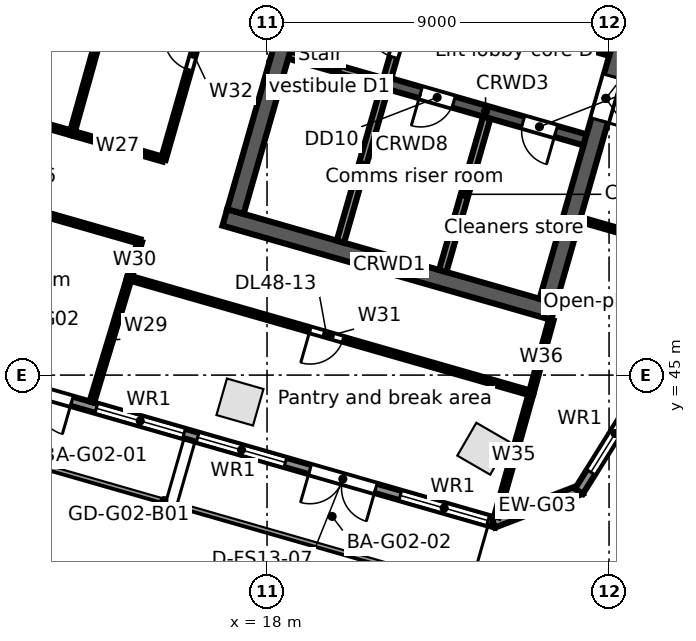
"""IFC4 building model, lengths in metres.
Left out: names, types, materials, properties, quantities, classifications, styles, units other than length and angle.
Written with IfcOpenShell. Run it as: python <this file> out.ifc"""

import sys

from ifc_helpers import new_model, si_unit, direction, frame, frame_2d, origin, origin_2d, place, context, subcontext, project, spatial, rectangle, extrude, element, fill, save


model = new_model("IFC4")
c1 = context("Model", 3, precision=1e-05, world=origin(), true_north=direction((0.0, 1.0)))
c2 = subcontext(c1, "Body", "Model", "MODEL_VIEW")
j1 = project(units=[si_unit("LENGTHUNIT", "METRE"), si_unit("PLANEANGLEUNIT", "RADIAN")], contexts=[c1])
p1 = place(None, origin())
s1 = spatial("IfcSite", under=j1, at=p1, CompositionType="ELEMENT")
p2 = place(p1, origin())
s2 = spatial("IfcBuilding", under=s1, at=p2, CompositionType="ELEMENT")
p3 = place(p2, frame((0.0, 0.0, 227.0)))
s3 = spatial("IfcBuildingStorey", under=s2, at=p3, CompositionType="ELEMENT", Elevation=227.0)
for number, where, z_axis, x_axis in (
    (1, (17.288, 44.291, 0.0), (0.0, 0.0, 1.0), (0.961, -0.276, 0.0)),
    (2, (23.69, 43.063, 0.0), (0.0, 0.0, 1.0), (-0.865, 0.501, 0.0)),
):
    element("IfcColumn", number, at=place(p3, frame(where, z_axis=z_axis, x_axis=x_axis)), inside=s3, PredefinedType="COLUMN", context=c2, shape_type="SweptSolid", body=[
        extrude(rectangle(XDim=1.0, YDim=1.0, at=origin_2d()), origin(), (0.0, 0.0, 1.0), 3.9),
    ])
p4 = place(p3, frame((24.034, 41.108, 0.0), z_axis=(0.0, 0.0, 1.0), x_axis=(-0.96126060691, 0.275641153683, 0.0)))
e3 = element("IfcWall", 3, at=p4, inside=s3, PredefinedType="STANDARD", context=c2, shape_type="SweptSolid", body=[
    extrude(rectangle(XDim=24.951, YDim=0.25, at=frame_2d((12.475, 0.0))), origin(), (0.0, 0.0, 1.0), 3.55),
])
p5 = place(p4, frame((22.416, 0.0, 0.8)))
e4 = element("IfcOpeningElement", 4, at=p5, cuts=e3, PredefinedType="OPENING", context=c2, shape_type="SweptSolid", body=[
    extrude(rectangle(XDim=2.4, YDim=2.2, at=frame_2d((1.2, 1.1))), frame((0.0, 0.135, 0.0), z_axis=(0.0, -1.0, 0.0), x_axis=(1.0, 0.0, 0.0)), (0.0, 0.0, 1.0), 0.27),
])
p6 = place(p4, frame((19.643, 0.0, 0.8)))
e5 = element("IfcOpeningElement", 5, at=p6, cuts=e3, PredefinedType="OPENING", context=c2, shape_type="SweptSolid", body=[
    extrude(rectangle(XDim=2.4, YDim=2.2, at=frame_2d((1.2, 1.1))), frame((0.0, 0.135, 0.0), z_axis=(0.0, -1.0, 0.0), x_axis=(1.0, 0.0, 0.0)), (0.0, 0.0, 1.0), 0.27),
])
p7 = place(p4, frame((16.869, 0.0, 0.8)))
e6 = element("IfcOpeningElement", 6, at=p7, cuts=e3, PredefinedType="OPENING", context=c2, shape_type="SweptSolid", body=[
    extrude(rectangle(XDim=2.4, YDim=2.2, at=frame_2d((1.2, 1.1))), frame((0.0, 0.135, 0.0), z_axis=(0.0, -1.0, 0.0), x_axis=(1.0, 0.0, 0.0)), (0.0, 0.0, 1.0), 0.27),
])
p8 = place(p4, frame((14.096, 0.0, 0.8)))
e7 = element("IfcOpeningElement", 7, at=p8, cuts=e3, PredefinedType="OPENING", context=c2, shape_type="SweptSolid", body=[
    extrude(rectangle(XDim=2.4, YDim=2.2, at=frame_2d((1.2, 1.1))), frame((0.0, 0.135, 0.0), z_axis=(0.0, -1.0, 0.0), x_axis=(1.0, 0.0, 0.0)), (0.0, 0.0, 1.0), 0.27),
])
p9 = place(p4, frame((11.622, 0.0, 0.0)))
e8 = element("IfcOpeningElement", 8, at=p9, cuts=e3, PredefinedType="OPENING", context=c2, shape_type="SweptSolid", body=[
    extrude(rectangle(XDim=1.8, YDim=2.4, at=frame_2d((0.9, 1.2))), frame((0.0, 0.135, 0.0), z_axis=(0.0, -1.0, 0.0), x_axis=(1.0, 0.0, 0.0)), (0.0, 0.0, 1.0), 0.27),
])
p10 = place(p4, frame((8.549, 0.0, 0.8)))
e9 = element("IfcOpeningElement", 9, at=p10, cuts=e3, PredefinedType="OPENING", context=c2, shape_type="SweptSolid", body=[
    extrude(rectangle(XDim=2.4, YDim=2.2, at=frame_2d((1.2, 1.1))), frame((0.0, 0.135, 0.0), z_axis=(0.0, -1.0, 0.0), x_axis=(1.0, 0.0, 0.0)), (0.0, 0.0, 1.0), 0.27),
])
p11 = place(p4, frame((5.775, 0.0, 0.8)))
e10 = element("IfcOpeningElement", 10, at=p11, cuts=e3, PredefinedType="OPENING", context=c2, shape_type="SweptSolid", body=[
    extrude(rectangle(XDim=2.4, YDim=2.2, at=frame_2d((1.2, 1.1))), frame((0.0, 0.135, 0.0), z_axis=(0.0, -1.0, 0.0), x_axis=(1.0, 0.0, 0.0)), (0.0, 0.0, 1.0), 0.27),
])
p12 = place(p4, frame((3.302, 0.0, 0.0)))
e11 = element("IfcOpeningElement", 11, at=p12, cuts=e3, PredefinedType="OPENING", context=c2, shape_type="SweptSolid", body=[
    extrude(rectangle(XDim=1.8, YDim=2.4, at=frame_2d((0.9, 1.2))), frame((0.0, 0.135, 0.0), z_axis=(0.0, -1.0, 0.0), x_axis=(1.0, 0.0, 0.0)), (0.0, 0.0, 1.0), 0.27),
])
p13 = place(p4, frame((0.229, 0.0, 0.8)))
e12 = element("IfcOpeningElement", 12, at=p13, cuts=e3, PredefinedType="OPENING", context=c2, shape_type="SweptSolid", body=[
    extrude(rectangle(XDim=2.4, YDim=2.2, at=frame_2d((1.2, 1.1))), frame((0.0, 0.135, 0.0), z_axis=(0.0, -1.0, 0.0), x_axis=(1.0, 0.0, 0.0)), (0.0, 0.0, 1.0), 0.27),
])
p14 = place(p3, frame((26.27, 41.993, 0.0), z_axis=(0.0, 0.0, 1.0), x_axis=(-0.933573798066, -0.358385216722, 0.0)))
e13 = element("IfcWall", 13, at=p14, inside=s3, PredefinedType="STANDARD", context=c2, shape_type="SweptSolid", body=[
    extrude(rectangle(XDim=2.48, YDim=0.25, at=frame_2d((1.24, 0.0))), origin(), (0.0, 0.0, 1.0), 3.55),
])
p15 = place(p3, frame((37.392, 59.84, 0.0), z_axis=(0.0, 0.0, 1.0), x_axis=(-0.529919909431, -0.848047692992, 0.0)))
e14 = element("IfcWall", 14, at=p15, inside=s3, PredefinedType="STANDARD", context=c2, shape_type="SweptSolid", body=[
    extrude(rectangle(XDim=21.104, YDim=0.25, at=frame_2d((10.552, 0.0))), origin(), (0.0, 0.0, 1.0), 3.55),
])
p16 = place(p15, frame((18.112, 0.0, 0.8)))
e15 = element("IfcOpeningElement", 15, at=p16, cuts=e14, PredefinedType="OPENING", context=c2, shape_type="SweptSolid", body=[
    extrude(rectangle(XDim=2.4, YDim=2.2, at=frame_2d((1.2, 1.1))), frame((0.0, 0.135, 0.0), z_axis=(0.0, -1.0, 0.0), x_axis=(1.0, 0.0, 0.0)), (0.0, 0.0, 1.0), 0.27),
])
p17 = place(p15, frame((14.612, 0.0, 0.8)))
e16 = element("IfcOpeningElement", 16, at=p17, cuts=e14, PredefinedType="OPENING", context=c2, shape_type="SweptSolid", body=[
    extrude(rectangle(XDim=2.4, YDim=2.2, at=frame_2d((1.2, 1.1))), frame((0.0, 0.135, 0.0), z_axis=(0.0, -1.0, 0.0), x_axis=(1.0, 0.0, 0.0)), (0.0, 0.0, 1.0), 0.27),
])
p18 = place(p15, frame((11.112, 0.0, 0.8)))
e17 = element("IfcOpeningElement", 17, at=p18, cuts=e14, PredefinedType="OPENING", context=c2, shape_type="SweptSolid", body=[
    extrude(rectangle(XDim=2.4, YDim=2.2, at=frame_2d((1.2, 1.1))), frame((0.0, 0.135, 0.0), z_axis=(0.0, -1.0, 0.0), x_axis=(1.0, 0.0, 0.0)), (0.0, 0.0, 1.0), 0.27),
])
p19 = place(p15, frame((7.612, 0.0, 0.8)))
e18 = element("IfcOpeningElement", 18, at=p19, cuts=e14, PredefinedType="OPENING", context=c2, shape_type="SweptSolid", body=[
    extrude(rectangle(XDim=2.4, YDim=2.2, at=frame_2d((1.2, 1.1))), frame((0.0, 0.135, 0.0), z_axis=(0.0, -1.0, 0.0), x_axis=(1.0, 0.0, 0.0)), (0.0, 0.0, 1.0), 0.27),
])
p20 = place(p15, frame((4.112, 0.0, 0.8)))
e19 = element("IfcOpeningElement", 19, at=p20, cuts=e14, PredefinedType="OPENING", context=c2, shape_type="SweptSolid", body=[
    extrude(rectangle(XDim=2.4, YDim=2.2, at=frame_2d((1.2, 1.1))), frame((0.0, 0.135, 0.0), z_axis=(0.0, -1.0, 0.0), x_axis=(1.0, 0.0, 0.0)), (0.0, 0.0, 1.0), 0.27),
])
p21 = place(p15, frame((0.612, 0.0, 0.8)))
e20 = element("IfcOpeningElement", 20, at=p21, cuts=e14, PredefinedType="OPENING", context=c2, shape_type="SweptSolid", body=[
    extrude(rectangle(XDim=2.4, YDim=2.2, at=frame_2d((1.2, 1.1))), frame((0.0, 0.135, 0.0), z_axis=(0.0, -1.0, 0.0), x_axis=(1.0, 0.0, 0.0)), (0.0, 0.0, 1.0), 0.27),
])
p22 = place(p3, frame((16.89, 49.149, 0.0), z_axis=(0.0, 0.0, 1.0), x_axis=(0.96126248289, -0.275634611374, 0.0)))
e21 = element("IfcWall", 21, at=p22, inside=s3, PredefinedType="SOLIDWALL", context=c2, shape_type="SweptSolid", body=[
    extrude(rectangle(XDim=9.0, YDim=0.45, at=frame_2d((4.5, 0.0))), origin(), (0.0, 0.0, 1.0), 3.55),
])
p23 = place(p3, frame((18.583, 53.423, 0.0), z_axis=(0.0, 0.0, 1.0), x_axis=(0.961259287968, -0.275645753268, 0.0)))
e22 = element("IfcWall", 22, at=p23, inside=s3, PredefinedType="SOLIDWALL", context=c2, shape_type="SweptSolid", body=[
    extrude(rectangle(XDim=2.65, YDim=0.2, at=frame_2d((1.325, 0.0))), origin(), (0.0, 0.0, 1.0), 3.55),
])
p24 = place(p3, frame((21.131, 52.692, 0.0), z_axis=(0.0, 0.0, 1.0), x_axis=(0.961261488075, -0.275638080722, 0.0)))
e23 = element("IfcWall", 23, at=p24, inside=s3, PredefinedType="SOLIDWALL", context=c2, shape_type="SweptSolid", body=[
    extrude(rectangle(XDim=5.45, YDim=0.3, at=frame_2d((2.725, 0.0))), origin(), (0.0, 0.0, 1.0), 3.55),
])
p25 = place(p24, frame((0.95, 0.0, 0.0)))
e24 = element("IfcOpeningElement", 24, at=p25, cuts=e23, PredefinedType="OPENING", context=c2, shape_type="SweptSolid", body=[
    extrude(rectangle(XDim=0.9, YDim=2.1, at=frame_2d((0.45, 1.05))), frame((0.0, 0.16, 0.0), z_axis=(0.0, -1.0, 0.0), x_axis=(1.0, 0.0, 0.0)), (0.0, 0.0, 1.0), 0.32),
])
p26 = place(p24, frame((3.75, 0.0, 0.0)))
e25 = element("IfcOpeningElement", 25, at=p26, cuts=e23, PredefinedType="OPENING", context=c2, shape_type="SweptSolid", body=[
    extrude(rectangle(XDim=0.9, YDim=2.1, at=frame_2d((0.45, 1.05))), frame((0.0, 0.16, 0.0), z_axis=(0.0, -1.0, 0.0), x_axis=(1.0, 0.0, 0.0)), (0.0, 0.0, 1.0), 0.32),
])
p27 = place(p3, frame((26.214, 53.732, 0.0), z_axis=(0.0, 0.0, 1.0), x_axis=(0.961241665642, -0.275707200184, 0.0)))
e26 = element("IfcWall", 26, at=p27, inside=s3, PredefinedType="SOLIDWALL", context=c2, shape_type="SweptSolid", body=[
    extrude(rectangle(XDim=0.85, YDim=0.2, at=frame_2d((0.425, 0.0))), origin(), (0.0, 0.0, 1.0), 3.55),
])
p28 = place(p3, frame((17.168, 49.303, 0.0), z_axis=(0.0, 0.0, 1.0), x_axis=(0.275638974822, 0.961261231695, 0.0)))
e27 = element("IfcWall", 27, at=p28, inside=s3, PredefinedType="SOLIDWALL", context=c2, shape_type="SweptSolid", body=[
    extrude(rectangle(XDim=11.1, YDim=0.45, at=frame_2d((5.55, 0.0))), origin(), (0.0, 0.0, 1.0), 3.55),
])
p29 = place(p28, frame((4.95, 0.0, 0.0)))
e28 = element("IfcOpeningElement", 28, at=p29, cuts=e27, PredefinedType="OPENING", context=c2, shape_type="SweptSolid", body=[
    extrude(rectangle(XDim=1.2, YDim=2.1, at=frame_2d((0.6, 1.05))), frame((0.0, 0.235, 0.0), z_axis=(0.0, -1.0, 0.0), x_axis=(1.0, 0.0, 0.0)), (0.0, 0.0, 1.0), 0.47),
])
p30 = place(p3, frame((19.932, 48.511, 0.0), z_axis=(0.0, 0.0, 1.0), x_axis=(0.275642273411, 0.961260285827, 0.0)))
e29 = element("IfcWall", 29, at=p30, inside=s3, PredefinedType="SOLIDWALL", context=c2, shape_type="SweptSolid", body=[
    extrude(rectangle(XDim=4.2, YDim=0.2, at=frame_2d((2.1, 0.0))), origin(), (0.0, 0.0, 1.0), 3.55),
])
p31 = place(p3, frame((21.172, 52.837, 0.0), z_axis=(0.0, 0.0, 1.0), x_axis=(0.275657676022, 0.961255868981, 0.0)))
e30 = element("IfcWall", 30, at=p31, inside=s3, PredefinedType="PARTITIONING", context=c2, shape_type="SweptSolid", body=[
    extrude(rectangle(XDim=2.1, YDim=0.2, at=frame_2d((1.05, 0.0))), origin(), (0.0, 0.0, 1.0), 3.55),
])
p32 = place(p31, frame((0.55, 0.0, 0.0)))
e31 = element("IfcOpeningElement", 31, at=p32, cuts=e30, PredefinedType="OPENING", context=c2, shape_type="SweptSolid", body=[
    extrude(rectangle(XDim=1.0, YDim=2.1, at=frame_2d((0.5, 1.05))), frame((0.0, 0.11, 0.0), z_axis=(0.0, -1.0, 0.0), x_axis=(1.0, 0.0, 0.0)), (0.0, 0.0, 1.0), 0.22),
])
p33 = place(p3, frame((22.623, 47.739, 0.0), z_axis=(0.0, 0.0, 1.0), x_axis=(0.275642273411, 0.961260285827, 0.0)))
e32 = element("IfcWall", 32, at=p33, inside=s3, PredefinedType="PARTITIONING", context=c2, shape_type="SweptSolid", body=[
    extrude(rectangle(XDim=4.2, YDim=0.2, at=frame_2d((2.1, 0.0))), origin(), (0.0, 0.0, 1.0), 3.55),
])
p34 = place(p3, frame((25.387, 46.947, 0.0), z_axis=(0.0, 0.0, 1.0), x_axis=(0.275638974822, 0.961261231695, 0.0)))
e33 = element("IfcWall", 33, at=p34, inside=s3, PredefinedType="SOLIDWALL", context=c2, shape_type="SweptSolid", body=[
    extrude(rectangle(XDim=11.1, YDim=0.45, at=frame_2d((5.55, 0.0))), origin(), (0.0, 0.0, 1.0), 3.55),
])
p35 = place(p34, frame((4.95, 0.0, 0.0)))
e34 = element("IfcOpeningElement", 34, at=p35, cuts=e33, PredefinedType="OPENING", context=c2, shape_type="SweptSolid", body=[
    extrude(rectangle(XDim=1.2, YDim=2.1, at=frame_2d((0.6, 1.05))), frame((0.0, 0.235, 0.0), z_axis=(0.0, -1.0, 0.0), x_axis=(1.0, 0.0, 0.0)), (0.0, 0.0, 1.0), 0.47),
])
p36 = place(p3, frame((0.0, 55.0, 0.0), z_axis=(0.0, 0.0, 1.0), x_axis=(0.962402937884, -0.271625818271, 0.0)))
e35 = element("IfcWall", 35, at=p36, inside=s3, PredefinedType="PARTITIONING", context=c2, shape_type="SweptSolid", body=[
    extrude(rectangle(XDim=13.372, YDim=0.125, at=frame_2d((6.686, 0.0))), origin(), (0.0, 0.0, 1.0), 2.618),
])
p37 = place(p36, frame((5.7, 0.0, 0.0)))
e36 = element("IfcOpeningElement", 36, at=p37, cuts=e35, PredefinedType="OPENING", context=c2, shape_type="SweptSolid", body=[
    extrude(rectangle(XDim=1.8, YDim=2.1, at=frame_2d((0.9, 1.05))), frame((0.0, 0.073, 0.0), z_axis=(0.0, -1.0, 0.0), x_axis=(1.0, 0.0, 0.0)), (0.0, 0.0, 1.0), 0.145),
])
p38 = place(p3, frame((6.482, 50.859, 0.0), z_axis=(0.0, 0.0, 1.0), x_axis=(0.961261196169, -0.275639098713, 0.0)))
e37 = element("IfcWall", 37, at=p38, inside=s3, PredefinedType="PARTITIONING", context=c2, shape_type="SweptSolid", body=[
    extrude(rectangle(XDim=8.5, YDim=0.125, at=frame_2d((4.25, 0.0))), origin(), (0.0, 0.0, 1.0), 2.618),
])
p39 = place(p38, frame((3.7, 0.0, 0.0)))
e38 = element("IfcOpeningElement", 38, at=p39, cuts=e37, PredefinedType="OPENING", context=c2, shape_type="SweptSolid", body=[
    extrude(rectangle(XDim=0.9, YDim=2.1, at=frame_2d((0.45, 1.05))), frame((0.0, 0.073, 0.0), z_axis=(0.0, -1.0, 0.0), x_axis=(1.0, 0.0, 0.0)), (0.0, 0.0, 1.0), 0.145),
])
p40 = place(p3, frame((12.869, 51.368, 0.0), z_axis=(0.0, 0.0, 1.0), x_axis=(0.961302601161, -0.275494662382, 0.0)))
e39 = element("IfcWall", 39, at=p40, inside=s3, PredefinedType="PARTITIONING", context=c2, shape_type="SweptSolid", body=[
    extrude(rectangle(XDim=2.501, YDim=0.125, at=frame_2d((1.25, 0.0))), origin(), (0.0, 0.0, 1.0), 3.55),
])
p41 = place(p3, frame((12.869, 51.368, 0.0), z_axis=(0.0, 0.0, 1.0), x_axis=(0.269547555311, 0.962987079574, 0.0)))
e40 = element("IfcWall", 40, at=p41, inside=s3, PredefinedType="PARTITIONING", context=c2, shape_type="SweptSolid", body=[
    extrude(rectangle(XDim=16.161, YDim=0.125, at=frame_2d((8.081, 0.0))), origin(), (0.0, 0.0, 1.0), 2.618),
])
p42 = place(p3, frame((13.39, 44.29, 0.0), z_axis=(0.0, 0.0, 1.0), x_axis=(0.289389501276, 0.957211427299, 0.0)))
e41 = element("IfcWall", 41, at=p42, inside=s3, PredefinedType="PARTITIONING", context=c2, shape_type="SweptSolid", body=[
    extrude(rectangle(XDim=3.411, YDim=0.125, at=frame_2d((1.706, 0.0))), origin(), (0.0, 0.0, 1.0), 2.83),
])
p43 = place(p3, frame((14.377, 47.555, 0.0), z_axis=(0.0, 0.0, 1.0), x_axis=(0.275204870584, 0.961385603807, 0.0)))
e42 = element("IfcWall", 42, at=p43, inside=s3, PredefinedType="PARTITIONING", context=c2, shape_type="SweptSolid", body=[
    extrude(rectangle(XDim=1.0, YDim=0.125, at=frame_2d((0.5, 0.0))), origin(), (0.0, 0.0, 1.0), 3.55),
])
p44 = place(p3, frame((14.377, 47.555, 0.0), z_axis=(0.0, 0.0, 1.0), x_axis=(0.961263044958, -0.275632651182, 0.0)))
e43 = element("IfcWall", 43, at=p44, inside=s3, PredefinedType="PARTITIONING", context=c2, shape_type="SweptSolid", body=[
    extrude(rectangle(XDim=11.0, YDim=0.125, at=frame_2d((5.5, 0.0))), origin(), (0.0, 0.0, 1.0), 2.822),
])
p45 = place(p44, frame((4.95, 0.0, 0.0)))
e44 = element("IfcOpeningElement", 44, at=p45, cuts=e43, PredefinedType="OPENING", context=c2, shape_type="SweptSolid", body=[
    extrude(rectangle(XDim=0.9, YDim=2.1, at=frame_2d((0.45, 1.05))), frame((0.0, 0.073, 0.0), z_axis=(0.0, -1.0, 0.0), x_axis=(1.0, 0.0, 0.0)), (0.0, 0.0, 1.0), 0.145),
])
p46 = place(p3, frame((15.273, 50.679, 0.0), z_axis=(0.0, 0.0, 1.0), x_axis=(0.275494973205, 0.961302512084, 0.0)))
e45 = element("IfcWall", 45, at=p46, inside=s3, PredefinedType="PARTITIONING", context=c2, shape_type="SweptSolid", body=[
    extrude(rectangle(XDim=5.75, YDim=0.125, at=frame_2d((2.875, 0.0))), origin(), (0.0, 0.0, 1.0), 2.618),
])
p47 = place(p46, frame((2.45, 0.0, 0.0)))
e46 = element("IfcOpeningElement", 46, at=p47, cuts=e45, PredefinedType="OPENING", context=c2, shape_type="SweptSolid", body=[
    extrude(rectangle(XDim=0.9, YDim=2.1, at=frame_2d((0.45, 1.05))), frame((0.0, 0.073, 0.0), z_axis=(0.0, -1.0, 0.0), x_axis=(1.0, 0.0, 0.0)), (0.0, 0.0, 1.0), 0.145),
])
p48 = place(p3, frame((24.036, 41.27, 0.0), z_axis=(0.0, 0.0, 1.0), x_axis=(0.270787421954, 0.962639170256, 0.0)))
e47 = element("IfcWall", 47, at=p48, inside=s3, PredefinedType="PARTITIONING", context=c2, shape_type="SweptSolid", body=[
    extrude(rectangle(XDim=3.379, YDim=0.125, at=frame_2d((1.689, 0.0))), origin(), (0.0, 0.0, 1.0), 2.822),
])
p49 = place(p3, frame((24.951, 44.523, 0.0), z_axis=(0.0, 0.0, 1.0), x_axis=(0.264046927145, 0.964509834198, 0.0)))
e48 = element("IfcWall", 48, at=p49, inside=s3, PredefinedType="PARTITIONING", context=c2, shape_type="SweptSolid", body=[
    extrude(rectangle(XDim=2.0, YDim=0.125, at=frame_2d((1.0, 0.0))), origin(), (0.0, 0.0, 1.0), 2.822),
])
p50 = place(p3, frame((26.237, 49.096, 0.0), z_axis=(0.0, 0.0, 1.0), x_axis=(0.961285271066, -0.275555126304, 0.0)))
e49 = element("IfcWall", 49, at=p50, inside=s3, PredefinedType="PARTITIONING", context=c2, shape_type="SweptSolid", body=[
    extrude(rectangle(XDim=3.789, YDim=0.125, at=frame_2d((1.894, 0.0))), origin(), (0.0, 0.0, 1.0), 2.822),
])
p51 = place(p50, frame((1.45, 0.0, 0.0)))
e50 = element("IfcOpeningElement", 50, at=p51, cuts=e49, PredefinedType="OPENING", context=c2, shape_type="SweptSolid", body=[
    extrude(rectangle(XDim=0.9, YDim=2.1, at=frame_2d((0.45, 1.05))), frame((0.0, 0.073, 0.0), z_axis=(0.0, -1.0, 0.0), x_axis=(1.0, 0.0, 0.0)), (0.0, 0.0, 1.0), 0.145),
])
p52 = place(p9, origin())
e51 = element("IfcDoor", 51, at=p52, inside=s3, OperationType="DOUBLE_DOOR_SINGLE_SWING", PredefinedType="DOOR", context=c2, shape_type="SweptSolid", body=[
    extrude(rectangle(XDim=1.8, YDim=2.4, at=frame_2d((0.9, 1.2))), frame((0.0, 0.025, 0.0), z_axis=(0.0, -1.0, 0.0), x_axis=(1.0, 0.0, 0.0)), (0.0, 0.0, 1.0), 0.05),
])
fill(e8, e51)
p53 = place(p10, origin())
e52 = element("IfcWindow", 52, at=p53, inside=s3, PartitioningType="SINGLE_PANEL", PredefinedType="WINDOW", context=c2, shape_type="SweptSolid", body=[
    extrude(rectangle(XDim=2.4, YDim=2.2, at=frame_2d((1.2, 1.1))), frame((0.0, 0.03, 0.0), z_axis=(0.0, -1.0, 0.0), x_axis=(1.0, 0.0, 0.0)), (0.0, 0.0, 1.0), 0.06),
])
fill(e9, e52)
p54 = place(p11, origin())
e53 = element("IfcWindow", 53, at=p54, inside=s3, PartitioningType="SINGLE_PANEL", PredefinedType="WINDOW", context=c2, shape_type="SweptSolid", body=[
    extrude(rectangle(XDim=2.4, YDim=2.2, at=frame_2d((1.2, 1.1))), frame((0.0, 0.03, 0.0), z_axis=(0.0, -1.0, 0.0), x_axis=(1.0, 0.0, 0.0)), (0.0, 0.0, 1.0), 0.06),
])
fill(e10, e53)
p55 = place(p12, origin())
e54 = element("IfcDoor", 54, at=p55, inside=s3, OperationType="DOUBLE_DOOR_SINGLE_SWING", PredefinedType="DOOR", context=c2, shape_type="SweptSolid", body=[
    extrude(rectangle(XDim=1.8, YDim=2.4, at=frame_2d((0.9, 1.2))), frame((0.0, 0.025, 0.0), z_axis=(0.0, -1.0, 0.0), x_axis=(1.0, 0.0, 0.0)), (0.0, 0.0, 1.0), 0.05),
])
fill(e11, e54)
p56 = place(p13, origin())
e55 = element("IfcWindow", 55, at=p56, inside=s3, PartitioningType="SINGLE_PANEL", PredefinedType="WINDOW", context=c2, shape_type="SweptSolid", body=[
    extrude(rectangle(XDim=2.4, YDim=2.2, at=frame_2d((1.2, 1.1))), frame((0.0, 0.03, 0.0), z_axis=(0.0, -1.0, 0.0), x_axis=(1.0, 0.0, 0.0)), (0.0, 0.0, 1.0), 0.06),
])
fill(e12, e55)
p57 = place(p16, origin())
e56 = element("IfcWindow", 56, at=p57, inside=s3, PartitioningType="SINGLE_PANEL", PredefinedType="WINDOW", context=c2, shape_type="SweptSolid", body=[
    extrude(rectangle(XDim=2.4, YDim=2.2, at=frame_2d((1.2, 1.1))), frame((0.0, 0.03, 0.0), z_axis=(0.0, -1.0, 0.0), x_axis=(1.0, 0.0, 0.0)), (0.0, 0.0, 1.0), 0.06),
])
fill(e15, e56)
p58 = place(p32, origin())
e57 = element("IfcDoor", 57, at=p58, inside=s3, OperationType="SINGLE_SWING_RIGHT", PredefinedType="DOOR", context=c2, shape_type="SweptSolid", body=[
    extrude(rectangle(XDim=1.0, YDim=2.1, at=frame_2d((0.5, 1.05))), frame((0.0, 0.025, 0.0), z_axis=(0.0, -1.0, 0.0), x_axis=(1.0, 0.0, 0.0)), (0.0, 0.0, 1.0), 0.05),
])
fill(e31, e57)
p59 = place(p35, frame((1.2, 0.0, 0.0), z_axis=(0.0, 0.0, 1.0), x_axis=(-1.0, 0.0, 0.0)))
e58 = element("IfcDoor", 58, at=p59, inside=s3, OperationType="SINGLE_SWING_RIGHT", PredefinedType="DOOR", context=c2, shape_type="SweptSolid", body=[
    extrude(rectangle(XDim=1.2, YDim=2.1, at=frame_2d((0.6, 1.05))), frame((0.0, 0.025, 0.0), z_axis=(0.0, -1.0, 0.0), x_axis=(1.0, 0.0, 0.0)), (0.0, 0.0, 1.0), 0.05),
])
fill(e34, e58)
p60 = place(p25, frame((0.9, 0.0, 0.0), z_axis=(0.0, 0.0, 1.0), x_axis=(-1.0, 0.0, 0.0)))
e59 = element("IfcDoor", 59, at=p60, inside=s3, OperationType="SINGLE_SWING_RIGHT", PredefinedType="DOOR", context=c2, shape_type="SweptSolid", body=[
    extrude(rectangle(XDim=0.9, YDim=2.1, at=frame_2d((0.45, 1.05))), frame((0.0, 0.025, 0.0), z_axis=(0.0, -1.0, 0.0), x_axis=(1.0, 0.0, 0.0)), (0.0, 0.0, 1.0), 0.05),
])
fill(e24, e59)
p61 = place(p26, frame((0.9, 0.0, 0.0), z_axis=(0.0, 0.0, 1.0), x_axis=(-1.0, 0.0, 0.0)))
e60 = element("IfcDoor", 60, at=p61, inside=s3, OperationType="SINGLE_SWING_LEFT", PredefinedType="DOOR", context=c2, shape_type="SweptSolid", body=[
    extrude(rectangle(XDim=0.9, YDim=2.1, at=frame_2d((0.45, 1.05))), frame((0.0, 0.025, 0.0), z_axis=(0.0, -1.0, 0.0), x_axis=(1.0, 0.0, 0.0)), (0.0, 0.0, 1.0), 0.05),
])
fill(e25, e60)
p62 = place(p47, origin())
e61 = element("IfcDoor", 61, at=p62, inside=s3, OperationType="SINGLE_SWING_RIGHT", PredefinedType="DOOR", context=c2, shape_type="SweptSolid", body=[
    extrude(rectangle(XDim=0.9, YDim=2.1, at=frame_2d((0.45, 1.05))), frame((0.0, 0.025, 0.0), z_axis=(0.0, -1.0, 0.0), x_axis=(1.0, 0.0, 0.0)), (0.0, 0.0, 1.0), 0.05),
])
fill(e46, e61)
p63 = place(p45, frame((0.9, 0.0, 0.0), z_axis=(0.0, 0.0, 1.0), x_axis=(-1.0, 0.0, 0.0)))
e62 = element("IfcDoor", 62, at=p63, inside=s3, OperationType="SINGLE_SWING_RIGHT", PredefinedType="DOOR", context=c2, shape_type="SweptSolid", body=[
    extrude(rectangle(XDim=0.9, YDim=2.1, at=frame_2d((0.45, 1.05))), frame((0.0, 0.025, 0.0), z_axis=(0.0, -1.0, 0.0), x_axis=(1.0, 0.0, 0.0)), (0.0, 0.0, 1.0), 0.05),
])
fill(e44, e62)
save(model, sys.argv[1])
